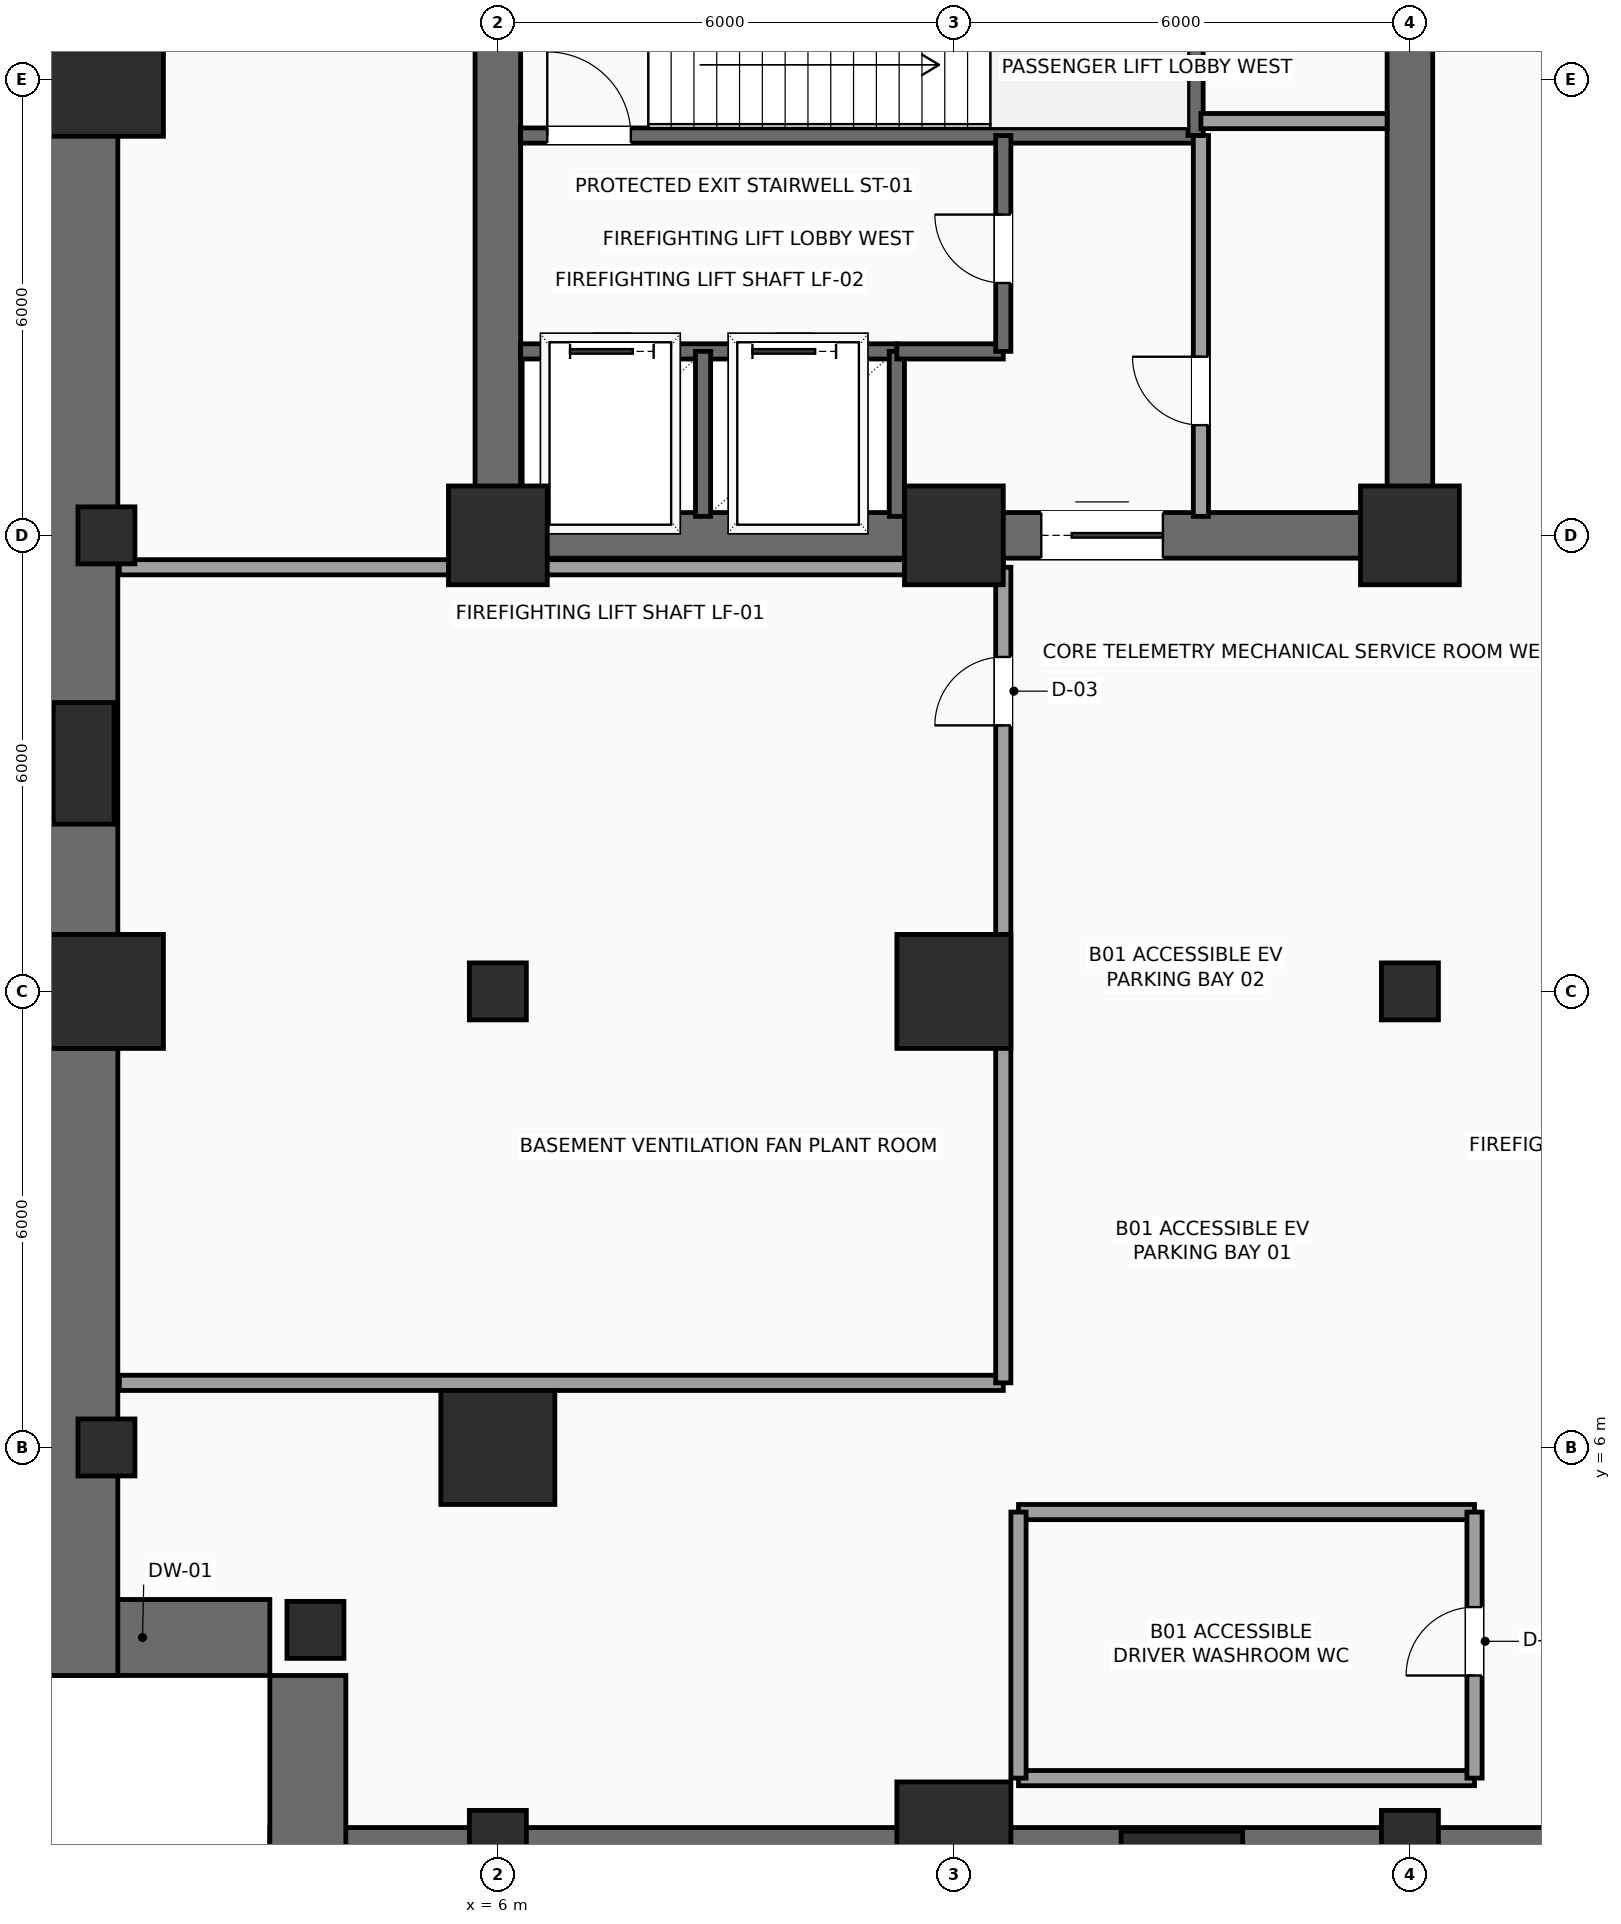
"""IFC4 building model, lengths in metres.
Left out: names, types, materials, properties, quantities, classifications, styles, units other than length and angle.
Written with IfcOpenShell. Run it as: python <this file> out.ifc"""

import sys

from ifc_helpers import new_model, si_unit, direction, frame, frame_2d, origin, origin_2d, place, context, subcontext, project, spatial, rectangle, hollow_rectangle, extrude, element, fill, save


model = new_model("IFC4")
c1 = context("Model", 3, precision=1e-05, world=origin(), true_north=direction((0.0, 1.0)))
c2 = subcontext(c1, "Body", "Model", "MODEL_VIEW")
j1 = project(units=[si_unit("LENGTHUNIT", "METRE"), si_unit("PLANEANGLEUNIT", "RADIAN")], contexts=[c1])
p1 = place(None, origin())
s1 = spatial("IfcSite", under=j1, at=p1, CompositionType="ELEMENT")
p2 = place(p1, origin())
s2 = spatial("IfcBuilding", under=s1, at=p2, CompositionType="ELEMENT")
p3 = place(p2, frame((0.0, 0.0, -4.8)))
s3 = spatial("IfcBuildingStorey", under=s2, at=p3, CompositionType="ELEMENT", Elevation=-4.8)
for number, where, z_axis, x_axis in (
    (1, (6.0, 18.0, 0.0), (0.0, 0.0, 1.0), (1.0, 0.0, 0.0)),
    (2, (12.0, 18.0, 0.0), (0.0, 0.0, 1.0), (1.0, 0.0, 0.0)),
    (3, (18.0, 18.0, 0.0), (0.0, 0.0, 1.0), (1.0, 0.0, 0.0)),
):
    element("IfcColumn", number, at=place(p3, frame(where, z_axis=z_axis, x_axis=x_axis)), inside=s3, PredefinedType="COLUMN", context=c2, shape_type="SweptSolid", body=[
        extrude(rectangle(XDim=1.3, YDim=1.3, at=origin_2d()), origin(), (0.0, 0.0, 1.0), 4.8),
    ])
for number, where, z_axis, x_axis in (
    (4, (3.6, 3.6, 0.0), (0.0, 0.0, 1.0), (1.0, 0.0, 0.0)),
    (5, (0.85, 6.0, 0.0), (0.0, 0.0, 1.0), (1.0, 0.0, 0.0)),
):
    element("IfcColumn", number, at=place(p3, frame(where, z_axis=z_axis, x_axis=x_axis)), inside=s3, PredefinedType="COLUMN", context=c2, shape_type="SweptSolid", body=[
        extrude(hollow_rectangle(XDim=0.75, YDim=0.75, WallThickness=0.035, InnerFilletRadius=0.035, OuterFilletRadius=0.05, at=origin_2d()), origin(), (0.0, 0.0, 1.0), 4.8),
    ])
p4 = place(p3, frame((0.85, 12.0, 0.0), z_axis=(0.0, 0.0, 1.0), x_axis=(1.0, 0.0, 0.0)))
e6 = element("IfcColumn", 6, at=p4, inside=s3, PredefinedType="COLUMN", context=c2, shape_type="SweptSolid", body=[
    extrude(rectangle(XDim=1.5, YDim=1.5, at=origin_2d()), origin(), (0.0, 0.0, 1.0), 4.8),
])
p5 = place(p3, frame((0.85, 18.0, 0.0), z_axis=(0.0, 0.0, 1.0), x_axis=(1.0, 0.0, 0.0)))
e7 = element("IfcColumn", 7, at=p5, inside=s3, PredefinedType="COLUMN", context=c2, shape_type="SweptSolid", body=[
    extrude(hollow_rectangle(XDim=0.75, YDim=0.75, WallThickness=0.035, InnerFilletRadius=0.035, OuterFilletRadius=0.05, at=origin_2d()), origin(), (0.0, 0.0, 1.0), 4.8),
])
p6 = place(p3, frame((0.85, 24.0, 0.0), z_axis=(0.0, 0.0, 1.0), x_axis=(1.0, 0.0, 0.0)))
e8 = element("IfcColumn", 8, at=p6, inside=s3, PredefinedType="COLUMN", context=c2, shape_type="SweptSolid", body=[
    extrude(rectangle(XDim=1.5, YDim=1.5, at=origin_2d()), origin(), (0.0, 0.0, 1.0), 4.8),
])
p7 = place(p3, frame((6.0, 0.85, 0.0), z_axis=(0.0, 0.0, 1.0), x_axis=(1.0, 0.0, 0.0)))
e9 = element("IfcColumn", 9, at=p7, inside=s3, PredefinedType="COLUMN", context=c2, shape_type="SweptSolid", body=[
    extrude(hollow_rectangle(XDim=0.75, YDim=0.75, WallThickness=0.035, InnerFilletRadius=0.035, OuterFilletRadius=0.05, at=origin_2d()), origin(), (0.0, 0.0, 1.0), 4.8),
])
p8 = place(p3, frame((6.0, 6.0, 0.0), z_axis=(0.0, 0.0, 1.0), x_axis=(1.0, 0.0, 0.0)))
e10 = element("IfcColumn", 10, at=p8, inside=s3, PredefinedType="COLUMN", context=c2, shape_type="SweptSolid", body=[
    extrude(rectangle(XDim=1.5, YDim=1.5, at=origin_2d()), origin(), (0.0, 0.0, 1.0), 4.8),
])
p9 = place(p3, frame((6.0, 12.0, 0.0), z_axis=(0.0, 0.0, 1.0), x_axis=(1.0, 0.0, 0.0)))
e11 = element("IfcColumn", 11, at=p9, inside=s3, PredefinedType="COLUMN", context=c2, shape_type="SweptSolid", body=[
    extrude(hollow_rectangle(XDim=0.75, YDim=0.75, WallThickness=0.035, InnerFilletRadius=0.035, OuterFilletRadius=0.05, at=origin_2d()), origin(), (0.0, 0.0, 1.0), 4.8),
])
for number, where, z_axis, x_axis in (
    (12, (12.0, 0.85, 0.0), (0.0, 0.0, 1.0), (1.0, 0.0, 0.0)),
    (13, (12.0, 12.0, 0.0), (0.0, 0.0, 1.0), (1.0, 0.0, 0.0)),
):
    element("IfcColumn", number, at=place(p3, frame(where, z_axis=z_axis, x_axis=x_axis)), inside=s3, PredefinedType="COLUMN", context=c2, shape_type="SweptSolid", body=[
        extrude(rectangle(XDim=1.5, YDim=1.5, at=origin_2d()), origin(), (0.0, 0.0, 1.0), 4.8),
    ])
for number, where, z_axis, x_axis in (
    (14, (18.0, 0.85, 0.0), (0.0, 0.0, 1.0), (1.0, 0.0, 0.0)),
    (15, (18.0, 12.0, 0.0), (0.0, 0.0, 1.0), (1.0, 0.0, 0.0)),
):
    element("IfcColumn", number, at=place(p3, frame(where, z_axis=z_axis, x_axis=x_axis)), inside=s3, PredefinedType="COLUMN", context=c2, shape_type="SweptSolid", body=[
        extrude(hollow_rectangle(XDim=0.75, YDim=0.75, WallThickness=0.035, InnerFilletRadius=0.035, OuterFilletRadius=0.05, at=origin_2d()), origin(), (0.0, 0.0, 1.0), 4.8),
    ])
for number, where, z_axis, x_axis in (
    (16, (0.55, 15.0, 0.0), (0.0, 0.0, 1.0), (1.0, 0.0, 0.0)),
    (17, (15.0, 0.55, 0.0), (0.0, 0.0, 1.0), (0.0, 1.0, 0.0)),
):
    element("IfcColumn", number, at=place(p3, frame(where, z_axis=z_axis, x_axis=x_axis)), inside=s3, PredefinedType="COLUMN", context=c2, shape_type="SweptSolid", body=[
        extrude(rectangle(XDim=0.8, YDim=1.6, at=origin_2d()), origin(), (0.0, 0.0, 1.0), 4.8),
    ])
p10 = place(p3, frame((3.0, 3.5, 0.0), z_axis=(0.0, 0.0, 1.0), x_axis=(-1.0, 0.0, 0.0)))
e18 = element("IfcWall", 18, at=p10, inside=s3, PredefinedType="USERDEFINED", context=c2, shape_type="SweptSolid", body=[
    extrude(rectangle(XDim=3.0, YDim=1.0, at=frame_2d((1.5, 0.0))), origin(), (0.0, 0.0, 1.0), 4.45),
])
p11 = place(p3, frame((0.5, 3.0, 0.0), z_axis=(0.0, 0.0, 1.0), x_axis=(0.0, 1.0, 0.0)))
e19 = element("IfcWall", 19, at=p11, inside=s3, PredefinedType="USERDEFINED", context=c2, shape_type="SweptSolid", body=[
    extrude(rectangle(XDim=42.0, YDim=1.0, at=frame_2d((21.0, 0.0))), origin(), (0.0, 0.0, 1.0), 4.45),
])
p12 = place(p3, frame((60.0, 0.5, 0.0), z_axis=(0.0, 0.0, 1.0), x_axis=(-1.0, 0.0, 0.0)))
e20 = element("IfcWall", 20, at=p12, inside=s3, PredefinedType="USERDEFINED", context=c2, shape_type="SweptSolid", body=[
    extrude(rectangle(XDim=57.0, YDim=1.0, at=frame_2d((28.5, 0.0))), origin(), (0.0, 0.0, 1.0), 4.45),
])
p13 = place(p3, frame((3.5, 0.0, 0.0), z_axis=(0.0, 0.0, 1.0), x_axis=(0.0, 1.0, 0.0)))
e21 = element("IfcWall", 21, at=p13, inside=s3, PredefinedType="USERDEFINED", context=c2, shape_type="SweptSolid", body=[
    extrude(rectangle(XDim=3.0, YDim=1.0, at=frame_2d((1.5, 0.0))), origin(), (0.0, 0.0, 1.0), 4.45),
])
p14 = place(p3, frame((6.0, 18.0, 0.0), z_axis=(0.0, 0.0, 1.0), x_axis=(1.0, 0.0, 0.0)))
e22 = element("IfcWall", 22, at=p14, inside=s3, PredefinedType="SHEAR", context=c2, shape_type="SweptSolid", body=[
    extrude(rectangle(XDim=12.0, YDim=0.6, at=frame_2d((6.0, 0.0))), origin(), (0.0, 0.0, 1.0), 4.45),
])
p15 = place(p14, frame((7.15, 0.0, 0.0)))
e23 = element("IfcOpeningElement", 23, at=p15, cuts=e22, PredefinedType="OPENING", context=c2, shape_type="SweptSolid", body=[
    extrude(rectangle(XDim=1.6, YDim=2.3, at=frame_2d((0.8, 1.15))), frame((0.0, 0.31, 0.0), z_axis=(0.0, -1.0, 0.0), x_axis=(1.0, 0.0, 0.0)), (0.0, 0.0, 1.0), 0.62),
])
for number, where, z_axis, x_axis in (
    (24, (6.0, 18.0, 0.0), (0.0, 0.0, 1.0), (0.0, 1.0, 0.0)),
    (25, (18.0, 18.0, 0.0), (0.0, 0.0, 1.0), (0.0, 1.0, 0.0)),
):
    element("IfcWall", number, at=place(p3, frame(where, z_axis=z_axis, x_axis=x_axis)), inside=s3, PredefinedType="SHEAR", context=c2, shape_type="SweptSolid", body=[
        extrude(rectangle(XDim=9.6, YDim=0.6, at=frame_2d((4.8, 0.0))), origin(), (0.0, 0.0, 1.0), 4.45),
    ])
p16 = place(p3, frame((6.3, 23.26, 0.0), z_axis=(0.0, 0.0, 1.0), x_axis=(1.0, 0.0, 0.0)))
e26 = element("IfcWall", 26, at=p16, inside=s3, PredefinedType="SHEAR", context=c2, shape_type="SweptSolid", body=[
    extrude(rectangle(XDim=8.88, YDim=0.2, at=frame_2d((4.44, 0.0))), origin(), (0.0, 0.0, 1.0), 4.45),
])
p17 = place(p16, frame((0.35, 0.0, 0.0)))
e27 = element("IfcOpeningElement", 27, at=p17, cuts=e26, PredefinedType="OPENING", context=c2, shape_type="SweptSolid", body=[
    extrude(rectangle(XDim=1.1, YDim=2.2, at=frame_2d((0.55, 1.1))), frame((0.0, 0.11, 0.0), z_axis=(0.0, -1.0, 0.0), x_axis=(1.0, 0.0, 0.0)), (0.0, 0.0, 1.0), 0.22),
])
p18 = place(p3, frame((15.18, 23.26, 0.0), z_axis=(0.0, 0.0, 1.0), x_axis=(0.0, 1.0, 0.0)))
e28 = element("IfcWall", 28, at=p18, inside=s3, PredefinedType="SHEAR", context=c2, shape_type="SweptSolid", body=[
    extrude(rectangle(XDim=4.04, YDim=0.2, at=frame_2d((2.02, 0.0))), origin(), (0.0, 0.0, 1.0), 4.45),
])
p19 = place(p3, frame((6.3, 20.42, 0.0), z_axis=(0.0, 0.0, 1.0), x_axis=(1.0, 0.0, 0.0)))
e29 = element("IfcWall", 29, at=p19, inside=s3, PredefinedType="SHEAR", context=c2, shape_type="SweptSolid", body=[
    extrude(rectangle(XDim=4.95, YDim=0.2, at=frame_2d((2.475, 0.0))), origin(), (0.0, 0.0, 1.0), 4.45),
])
p20 = place(p19, frame((0.65, 0.0, 0.0)))
e30 = element("IfcOpeningElement", 30, at=p20, cuts=e29, PredefinedType="OPENING", context=c2, shape_type="SweptSolid", body=[
    extrude(rectangle(XDim=1.1, YDim=2.2, at=frame_2d((0.55, 1.1))), frame((0.0, 0.11, 0.0), z_axis=(0.0, -1.0, 0.0), x_axis=(1.0, 0.0, 0.0)), (0.0, 0.0, 1.0), 0.22),
])
p21 = place(p19, frame((3.05, 0.0, 0.0)))
e31 = element("IfcOpeningElement", 31, at=p21, cuts=e29, PredefinedType="OPENING", context=c2, shape_type="SweptSolid", body=[
    extrude(rectangle(XDim=1.1, YDim=2.2, at=frame_2d((0.55, 1.1))), frame((0.0, 0.11, 0.0), z_axis=(0.0, -1.0, 0.0), x_axis=(1.0, 0.0, 0.0)), (0.0, 0.0, 1.0), 0.22),
])
for number, where, z_axis, x_axis in (
    (32, (8.7, 18.25, 0.0), (0.0, 0.0, 1.0), (0.0, 1.0, 0.0)),
    (33, (11.25, 18.25, 0.0), (0.0, 0.0, 1.0), (0.0, 1.0, 0.0)),
):
    element("IfcWall", number, at=place(p3, frame(where, z_axis=z_axis, x_axis=x_axis)), inside=s3, PredefinedType="SHEAR", context=c2, shape_type="SweptSolid", body=[
        extrude(rectangle(XDim=2.17, YDim=0.2, at=frame_2d((1.085, 0.0))), origin(), (0.0, 0.0, 1.0), 4.45),
    ])
p22 = place(p3, frame((11.25, 20.42, 0.0), z_axis=(0.0, 0.0, 1.0), x_axis=(1.0, 0.0, 0.0)))
e34 = element("IfcWall", 34, at=p22, inside=s3, PredefinedType="SHEAR", context=c2, shape_type="SweptSolid", body=[
    extrude(rectangle(XDim=1.4, YDim=0.2, at=frame_2d((0.7, 0.0))), origin(), (0.0, 0.0, 1.0), 4.45),
])
p23 = place(p3, frame((12.65, 20.42, 0.0), z_axis=(0.0, 0.0, 1.0), x_axis=(0.0, 1.0, 0.0)))
e35 = element("IfcWall", 35, at=p23, inside=s3, PredefinedType="SHEAR", context=c2, shape_type="SweptSolid", body=[
    extrude(rectangle(XDim=2.84, YDim=0.2, at=frame_2d((1.42, 0.0))), origin(), (0.0, 0.0, 1.0), 4.45),
])
p24 = place(p23, frame((0.9, 0.0, 0.0)))
e36 = element("IfcOpeningElement", 36, at=p24, cuts=e35, PredefinedType="OPENING", context=c2, shape_type="SweptSolid", body=[
    extrude(rectangle(XDim=0.9, YDim=2.15, at=frame_2d((0.45, 1.075))), frame((0.0, 0.11, 0.0), z_axis=(0.0, -1.0, 0.0), x_axis=(1.0, 0.0, 0.0)), (0.0, 0.0, 1.0), 0.22),
])
p25 = place(p3, frame((15.25, 18.25, 0.0), z_axis=(0.0, 0.0, 1.0), x_axis=(0.0, 1.0, 0.0)))
e37 = element("IfcWall", 37, at=p25, inside=s3, PredefinedType="SOLIDWALL", context=c2, shape_type="SweptSolid", body=[
    extrude(rectangle(XDim=5.01, YDim=0.2, at=frame_2d((2.505, 0.0))), origin(), (0.0, 0.0, 1.0), 4.45),
])
p26 = place(p25, frame((1.2, 0.0, 0.0)))
e38 = element("IfcOpeningElement", 38, at=p26, cuts=e37, PredefinedType="OPENING", context=c2, shape_type="SweptSolid", body=[
    extrude(rectangle(XDim=0.9, YDim=2.15, at=frame_2d((0.45, 1.075))), frame((0.0, 0.11, 0.0), z_axis=(0.0, -1.0, 0.0), x_axis=(1.0, 0.0, 0.0)), (0.0, 0.0, 1.0), 0.22),
])
p27 = place(p3, frame((15.25, 23.45, 0.0), z_axis=(0.0, 0.0, 1.0), x_axis=(1.0, 0.0, 0.0)))
e39 = element("IfcWall", 39, at=p27, inside=s3, PredefinedType="SOLIDWALL", context=c2, shape_type="SweptSolid", body=[
    extrude(rectangle(XDim=2.45, YDim=0.2, at=frame_2d((1.225, 0.0))), origin(), (0.0, 0.0, 1.0), 4.45),
])
for number, where, z_axis, x_axis in (
    (40, (1.02, 6.85, 0.0), (0.0, 0.0, 1.0), (1.0, 0.0, 0.0)),
    (41, (1.02, 17.58, 0.0), (0.0, 0.0, 1.0), (1.0, 0.0, 0.0)),
):
    element("IfcWall", number, at=place(p3, frame(where, z_axis=z_axis, x_axis=x_axis)), inside=s3, PredefinedType="SOLIDWALL", context=c2, shape_type="SweptSolid", body=[
        extrude(rectangle(XDim=11.63, YDim=0.2, at=frame_2d((5.815, 0.0))), origin(), (0.0, 0.0, 1.0), 4.45),
    ])
p28 = place(p3, frame((12.65, 6.85, 0.0), z_axis=(0.0, 0.0, 1.0), x_axis=(0.0, 1.0, 0.0)))
e42 = element("IfcWall", 42, at=p28, inside=s3, PredefinedType="SOLIDWALL", context=c2, shape_type="SweptSolid", body=[
    extrude(rectangle(XDim=10.73, YDim=0.2, at=frame_2d((5.365, 0.0))), origin(), (0.0, 0.0, 1.0), 4.45),
])
p29 = place(p28, frame((8.65, 0.0, 0.0)))
e43 = element("IfcOpeningElement", 43, at=p29, cuts=e42, PredefinedType="OPENING", context=c2, shape_type="SweptSolid", body=[
    extrude(rectangle(XDim=0.9, YDim=2.15, at=frame_2d((0.45, 1.075))), frame((0.0, 0.11, 0.0), z_axis=(0.0, -1.0, 0.0), x_axis=(1.0, 0.0, 0.0)), (0.0, 0.0, 1.0), 0.22),
])
for number, where, z_axis, x_axis in (
    (44, (12.85, 1.65, 0.0), (0.0, 0.0, 1.0), (1.0, 0.0, 0.0)),
    (45, (12.85, 5.15, 0.0), (0.0, 0.0, 1.0), (1.0, 0.0, 0.0)),
):
    element("IfcWall", number, at=place(p3, frame(where, z_axis=z_axis, x_axis=x_axis)), inside=s3, PredefinedType="SOLIDWALL", context=c2, shape_type="SweptSolid", body=[
        extrude(rectangle(XDim=6.0, YDim=0.2, at=frame_2d((3.0, 0.0))), origin(), (0.0, 0.0, 1.0), 4.45),
    ])
p30 = place(p3, frame((12.85, 1.65, 0.0), z_axis=(0.0, 0.0, 1.0), x_axis=(0.0, 1.0, 0.0)))
e46 = element("IfcWall", 46, at=p30, inside=s3, PredefinedType="SOLIDWALL", context=c2, shape_type="SweptSolid", body=[
    extrude(rectangle(XDim=3.5, YDim=0.2, at=frame_2d((1.75, 0.0))), origin(), (0.0, 0.0, 1.0), 4.45),
])
p31 = place(p3, frame((18.85, 1.65, 0.0), z_axis=(0.0, 0.0, 1.0), x_axis=(0.0, 1.0, 0.0)))
e47 = element("IfcWall", 47, at=p31, inside=s3, PredefinedType="SOLIDWALL", context=c2, shape_type="SweptSolid", body=[
    extrude(rectangle(XDim=3.5, YDim=0.2, at=frame_2d((1.75, 0.0))), origin(), (0.0, 0.0, 1.0), 4.45),
])
p32 = place(p31, frame((1.35, 0.0, 0.0)))
e48 = element("IfcOpeningElement", 48, at=p32, cuts=e47, PredefinedType="OPENING", context=c2, shape_type="SweptSolid", body=[
    extrude(rectangle(XDim=0.9, YDim=2.1, at=frame_2d((0.45, 1.05))), frame((0.0, 0.11, 0.0), z_axis=(0.0, -1.0, 0.0), x_axis=(1.0, 0.0, 0.0)), (0.0, 0.0, 1.0), 0.22),
])
p33 = place(p15, origin())
e49 = element("IfcDoor", 49, at=p33, inside=s3, OperationType="DOUBLE_DOOR_SLIDING", PredefinedType="DOOR", context=c2, shape_type="SweptSolid", body=[
    extrude(rectangle(XDim=1.6, YDim=2.3, at=frame_2d((0.8, 1.15))), frame((0.0, 0.025, 0.0), z_axis=(0.0, -1.0, 0.0), x_axis=(1.0, 0.0, 0.0)), (0.0, 0.0, 1.0), 0.05),
])
fill(e23, e49)
p34 = place(p17, origin())
e50 = element("IfcDoor", 50, at=p34, inside=s3, OperationType="SINGLE_SWING_LEFT", PredefinedType="DOOR", context=c2, shape_type="SweptSolid", body=[
    extrude(rectangle(XDim=1.1, YDim=2.2, at=frame_2d((0.55, 1.1))), frame((0.0, 0.025, 0.0), z_axis=(0.0, -1.0, 0.0), x_axis=(1.0, 0.0, 0.0)), (0.0, 0.0, 1.0), 0.05),
])
fill(e27, e50)
p35 = place(p20, origin())
e51 = element("IfcDoor", 51, at=p35, inside=s3, OperationType="SLIDING_TO_LEFT", PredefinedType="DOOR", context=c2, shape_type="SweptSolid", body=[
    extrude(rectangle(XDim=1.1, YDim=2.2, at=frame_2d((0.55, 1.1))), frame((0.0, 0.025, 0.0), z_axis=(0.0, -1.0, 0.0), x_axis=(1.0, 0.0, 0.0)), (0.0, 0.0, 1.0), 0.05),
])
fill(e30, e51)
p36 = place(p21, origin())
e52 = element("IfcDoor", 52, at=p36, inside=s3, OperationType="SLIDING_TO_LEFT", PredefinedType="DOOR", context=c2, shape_type="SweptSolid", body=[
    extrude(rectangle(XDim=1.1, YDim=2.2, at=frame_2d((0.55, 1.1))), frame((0.0, 0.025, 0.0), z_axis=(0.0, -1.0, 0.0), x_axis=(1.0, 0.0, 0.0)), (0.0, 0.0, 1.0), 0.05),
])
fill(e31, e52)
p37 = place(p24, origin())
e53 = element("IfcDoor", 53, at=p37, inside=s3, OperationType="SINGLE_SWING_RIGHT", PredefinedType="DOOR", context=c2, shape_type="SweptSolid", body=[
    extrude(rectangle(XDim=0.9, YDim=2.15, at=frame_2d((0.45, 1.075))), frame((0.0, 0.025, 0.0), z_axis=(0.0, -1.0, 0.0), x_axis=(1.0, 0.0, 0.0)), (0.0, 0.0, 1.0), 0.05),
])
fill(e36, e53)
p38 = place(p26, origin())
e54 = element("IfcDoor", 54, at=p38, inside=s3, OperationType="SINGLE_SWING_RIGHT", PredefinedType="DOOR", context=c2, shape_type="SweptSolid", body=[
    extrude(rectangle(XDim=0.9, YDim=2.15, at=frame_2d((0.45, 1.075))), frame((0.0, 0.025, 0.0), z_axis=(0.0, -1.0, 0.0), x_axis=(1.0, 0.0, 0.0)), (0.0, 0.0, 1.0), 0.05),
])
fill(e38, e54)
p39 = place(p29, origin())
e55 = element("IfcDoor", 55, at=p39, inside=s3, OperationType="SINGLE_SWING_LEFT", PredefinedType="DOOR", context=c2, shape_type="SweptSolid", body=[
    extrude(rectangle(XDim=0.9, YDim=2.15, at=frame_2d((0.45, 1.075))), frame((0.0, 0.025, 0.0), z_axis=(0.0, -1.0, 0.0), x_axis=(1.0, 0.0, 0.0)), (0.0, 0.0, 1.0), 0.05),
])
fill(e43, e55)
p40 = place(p32, origin())
e56 = element("IfcDoor", 56, at=p40, inside=s3, OperationType="SINGLE_SWING_LEFT", PredefinedType="DOOR", context=c2, shape_type="SweptSolid", body=[
    extrude(rectangle(XDim=0.9, YDim=2.1, at=frame_2d((0.45, 1.05))), frame((0.0, 0.025, 0.0), z_axis=(0.0, -1.0, 0.0), x_axis=(1.0, 0.0, 0.0)), (0.0, 0.0, 1.0), 0.05),
])
fill(e48, e56)
save(model, sys.argv[1])
